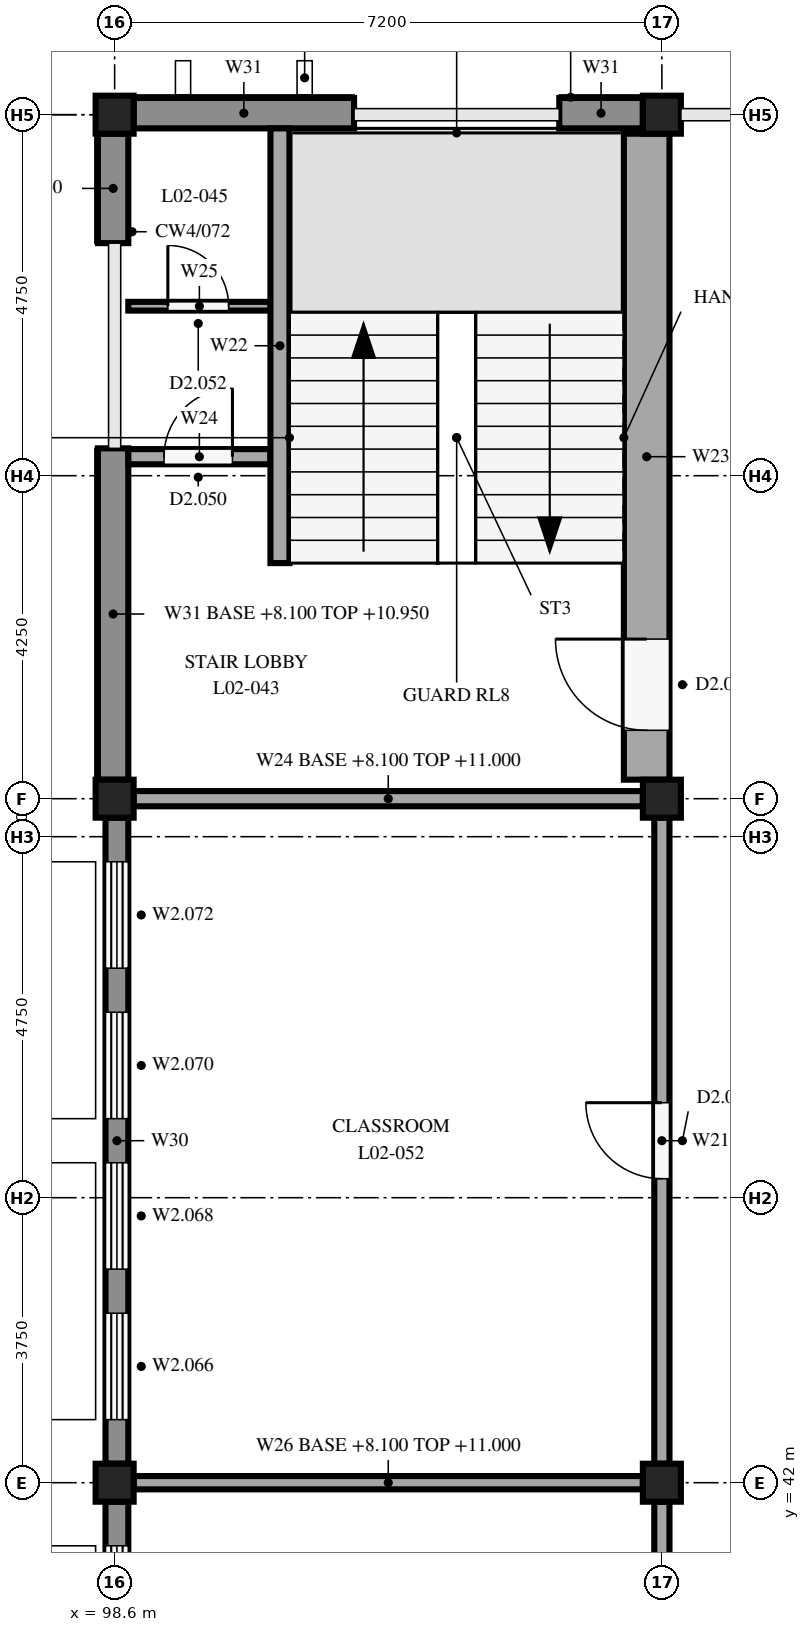
"""IFC4 building model, lengths in metres.
Left out: names, types, materials, properties, quantities, classifications, styles, units other than length and angle.
Written with IfcOpenShell. Run it as: python <this file> out.ifc"""

import sys

from ifc_helpers import new_model, si_unit, direction, frame, frame_2d, origin, origin_2d, place, context, subcontext, project, spatial, rectangle, extrude, element, fill, save


model = new_model("IFC4")
c1 = context("Model", 3, precision=1e-05, world=origin(), true_north=direction((0.0, 1.0)))
c2 = subcontext(c1, "Body", "Model", "MODEL_VIEW")
j1 = project(units=[si_unit("LENGTHUNIT", "METRE"), si_unit("PLANEANGLEUNIT", "RADIAN")], contexts=[c1])
p1 = place(None, origin())
s1 = spatial("IfcSite", under=j1, at=p1, CompositionType="ELEMENT")
p2 = place(p1, origin())
s2 = spatial("IfcBuilding", under=s1, at=p2, CompositionType="ELEMENT")
p3 = place(p2, frame((0.0, 0.0, 8.1)))
s3 = spatial("IfcBuildingStorey", under=s2, at=p3, CompositionType="ELEMENT", Elevation=8.1)
for number, where, z_axis, x_axis in (
    (1, (98.6, 42.0, 0.0), (0.0, 0.0, 1.0), (1.0, 0.0, 0.0)),
    (2, (98.6, 51.0, 0.0), (0.0, 0.0, 1.0), (1.0, 0.0, 0.0)),
    (3, (98.6, 60.0, 0.0), (0.0, 0.0, 1.0), (1.0, 0.0, 0.0)),
    (4, (105.8, 42.0, 0.0), (0.0, 0.0, 1.0), (1.0, 0.0, 0.0)),
    (5, (105.8, 51.0, 0.0), (0.0, 0.0, 1.0), (1.0, 0.0, 0.0)),
    (6, (105.8, 60.0, 0.0), (0.0, 0.0, 1.0), (1.0, 0.0, 0.0)),
):
    element("IfcColumn", number, at=place(p3, frame(where, z_axis=z_axis, x_axis=x_axis)), inside=s3, PredefinedType="COLUMN", context=c2, shape_type="SweptSolid", body=[
        extrude(rectangle(XDim=0.5, YDim=0.5, at=origin_2d()), origin(), (0.0, 0.0, 1.0), 3.35),
    ])
p4 = place(p3, frame((98.63, 33.25, 0.0), z_axis=(0.0, 0.0, 1.0), x_axis=(0.0, 1.0, 0.0)))
e7 = element("IfcWall", 7, at=p4, inside=s3, PredefinedType="STANDARD", context=c2, shape_type="SweptSolid", body=[
    extrude(rectangle(XDim=8.5, YDim=0.3, at=frame_2d((4.25, 0.0))), origin(), (0.0, 0.0, 1.0), 2.85),
])
p5 = place(p4, frame((0.58, 0.0, 0.3)))
e8 = element("IfcOpeningElement", 8, at=p5, cuts=e7, PredefinedType="OPENING", context=c2, shape_type="SweptSolid", body=[
    extrude(rectangle(XDim=1.4, YDim=2.5, at=frame_2d((0.7, 1.25))), frame((0.0, 0.16, 0.0), z_axis=(0.0, -1.0, 0.0), x_axis=(1.0, 0.0, 0.0)), (0.0, 0.0, 1.0), 0.32),
])
p6 = place(p4, frame((2.56, 0.0, 0.3)))
e9 = element("IfcOpeningElement", 9, at=p6, cuts=e7, PredefinedType="OPENING", context=c2, shape_type="SweptSolid", body=[
    extrude(rectangle(XDim=1.4, YDim=2.5, at=frame_2d((0.7, 1.25))), frame((0.0, 0.16, 0.0), z_axis=(0.0, -1.0, 0.0), x_axis=(1.0, 0.0, 0.0)), (0.0, 0.0, 1.0), 0.32),
])
p7 = place(p4, frame((4.54, 0.0, 0.3)))
e10 = element("IfcOpeningElement", 10, at=p7, cuts=e7, PredefinedType="OPENING", context=c2, shape_type="SweptSolid", body=[
    extrude(rectangle(XDim=1.4, YDim=2.5, at=frame_2d((0.7, 1.25))), frame((0.0, 0.16, 0.0), z_axis=(0.0, -1.0, 0.0), x_axis=(1.0, 0.0, 0.0)), (0.0, 0.0, 1.0), 0.32),
])
p8 = place(p4, frame((6.52, 0.0, 0.3)))
e11 = element("IfcOpeningElement", 11, at=p8, cuts=e7, PredefinedType="OPENING", context=c2, shape_type="SweptSolid", body=[
    extrude(rectangle(XDim=1.4, YDim=2.5, at=frame_2d((0.7, 1.25))), frame((0.0, 0.16, 0.0), z_axis=(0.0, -1.0, 0.0), x_axis=(1.0, 0.0, 0.0)), (0.0, 0.0, 1.0), 0.32),
])
p9 = place(p3, frame((98.63, 42.25, 0.0), z_axis=(0.0, 0.0, 1.0), x_axis=(0.0, 1.0, 0.0)))
e12 = element("IfcWall", 12, at=p9, inside=s3, PredefinedType="STANDARD", context=c2, shape_type="SweptSolid", body=[
    extrude(rectangle(XDim=8.5, YDim=0.3, at=frame_2d((4.25, 0.0))), origin(), (0.0, 0.0, 1.0), 2.85),
])
p10 = place(p9, frame((0.58, 0.0, 0.6)))
e13 = element("IfcOpeningElement", 13, at=p10, cuts=e12, PredefinedType="OPENING", context=c2, shape_type="SweptSolid", body=[
    extrude(rectangle(XDim=1.4, YDim=2.2, at=frame_2d((0.7, 1.1))), frame((0.0, 0.16, 0.0), z_axis=(0.0, -1.0, 0.0), x_axis=(1.0, 0.0, 0.0)), (0.0, 0.0, 1.0), 0.32),
])
p11 = place(p9, frame((2.56, 0.0, 0.6)))
e14 = element("IfcOpeningElement", 14, at=p11, cuts=e12, PredefinedType="OPENING", context=c2, shape_type="SweptSolid", body=[
    extrude(rectangle(XDim=1.4, YDim=2.2, at=frame_2d((0.7, 1.1))), frame((0.0, 0.16, 0.0), z_axis=(0.0, -1.0, 0.0), x_axis=(1.0, 0.0, 0.0)), (0.0, 0.0, 1.0), 0.32),
])
p12 = place(p9, frame((4.54, 0.0, 0.6)))
e15 = element("IfcOpeningElement", 15, at=p12, cuts=e12, PredefinedType="OPENING", context=c2, shape_type="SweptSolid", body=[
    extrude(rectangle(XDim=1.4, YDim=2.2, at=frame_2d((0.7, 1.1))), frame((0.0, 0.16, 0.0), z_axis=(0.0, -1.0, 0.0), x_axis=(1.0, 0.0, 0.0)), (0.0, 0.0, 1.0), 0.32),
])
p13 = place(p9, frame((6.52, 0.0, 0.6)))
e16 = element("IfcOpeningElement", 16, at=p13, cuts=e12, PredefinedType="OPENING", context=c2, shape_type="SweptSolid", body=[
    extrude(rectangle(XDim=1.4, YDim=2.2, at=frame_2d((0.7, 1.1))), frame((0.0, 0.16, 0.0), z_axis=(0.0, -1.0, 0.0), x_axis=(1.0, 0.0, 0.0)), (0.0, 0.0, 1.0), 0.32),
])
p14 = place(p3, frame((98.58, 51.25, 0.0), z_axis=(0.0, 0.0, 1.0), x_axis=(0.0, 1.0, 0.0)))
e17 = element("IfcWall", 17, at=p14, inside=s3, PredefinedType="STANDARD", context=c2, shape_type="SweptSolid", body=[
    extrude(rectangle(XDim=4.36, YDim=0.4, at=frame_2d((2.18, 0.0))), origin(), (0.0, 0.0, 1.0), 2.85),
])
p15 = place(p3, frame((98.58, 58.31, 0.0), z_axis=(0.0, 0.0, 1.0), x_axis=(0.0, 1.0, 0.0)))
e18 = element("IfcWall", 18, at=p15, inside=s3, PredefinedType="STANDARD", context=c2, shape_type="SweptSolid", body=[
    extrude(rectangle(XDim=1.44, YDim=0.4, at=frame_2d((0.72, 0.0))), origin(), (0.0, 0.0, 1.0), 2.85),
])
p16 = place(p3, frame((98.85, 60.02, 0.0), z_axis=(0.0, 0.0, 1.0), x_axis=(1.0, 0.0, 0.0)))
e19 = element("IfcWall", 19, at=p16, inside=s3, PredefinedType="STANDARD", context=c2, shape_type="SweptSolid", body=[
    extrude(rectangle(XDim=2.9, YDim=0.4, at=frame_2d((1.45, 0.0))), origin(), (0.0, 0.0, 1.0), 2.9),
])
p17 = place(p3, frame((104.45, 60.02, 0.0), z_axis=(0.0, 0.0, 1.0), x_axis=(1.0, 0.0, 0.0)))
e20 = element("IfcWall", 20, at=p17, inside=s3, PredefinedType="STANDARD", context=c2, shape_type="SweptSolid", body=[
    extrude(rectangle(XDim=1.1, YDim=0.4, at=frame_2d((0.55, 0.0))), origin(), (0.0, 0.0, 1.0), 2.9),
])
p18 = place(p3, frame((100.775, 54.1, 0.0), z_axis=(0.0, 0.0, 1.0), x_axis=(0.0, 1.0, 0.0)))
e21 = element("IfcWall", 21, at=p18, inside=s3, PredefinedType="SOLIDWALL", context=c2, shape_type="SweptSolid", body=[
    extrude(rectangle(XDim=5.72, YDim=0.25, at=frame_2d((2.86, 0.0))), origin(), (0.0, 0.0, 1.0), 3.35),
])
p19 = place(p3, frame((105.6, 51.25, 0.0), z_axis=(0.0, 0.0, 1.0), x_axis=(0.0, 1.0, 0.0)))
e22 = element("IfcWall", 22, at=p19, inside=s3, PredefinedType="SOLIDWALL", context=c2, shape_type="SweptSolid", body=[
    extrude(rectangle(XDim=8.5, YDim=0.6, at=frame_2d((4.25, 0.0))), origin(), (0.0, 0.0, 1.0), 3.35),
])
p20 = place(p19, frame((0.65, 0.0, 0.0)))
e23 = element("IfcOpeningElement", 23, at=p20, cuts=e22, PredefinedType="OPENING", context=c2, shape_type="SweptSolid", body=[
    extrude(rectangle(XDim=1.2, YDim=2.1, at=frame_2d((0.6, 1.05))), frame((0.0, 0.31, 0.0), z_axis=(0.0, -1.0, 0.0), x_axis=(1.0, 0.0, 0.0)), (0.0, 0.0, 1.0), 0.62),
])
p21 = place(p3, frame((98.78, 55.5, 0.0), z_axis=(0.0, 0.0, 1.0), x_axis=(1.0, 0.0, 0.0)))
e24 = element("IfcWall", 24, at=p21, inside=s3, PredefinedType="SOLIDWALL", context=c2, shape_type="SweptSolid", body=[
    extrude(rectangle(XDim=1.87, YDim=0.2, at=frame_2d((0.935, 0.0))), origin(), (0.0, 0.0, 1.0), 3.35),
])
p22 = place(p21, frame((0.47, 0.0, 0.0)))
e25 = element("IfcOpeningElement", 25, at=p22, cuts=e24, PredefinedType="OPENING", context=c2, shape_type="SweptSolid", body=[
    extrude(rectangle(XDim=0.9, YDim=2.1, at=frame_2d((0.45, 1.05))), frame((0.0, 0.11, 0.0), z_axis=(0.0, -1.0, 0.0), x_axis=(1.0, 0.0, 0.0)), (0.0, 0.0, 1.0), 0.22),
])
p23 = place(p3, frame((98.78, 57.48, 0.0), z_axis=(0.0, 0.0, 1.0), x_axis=(1.0, 0.0, 0.0)))
e26 = element("IfcWall", 26, at=p23, inside=s3, PredefinedType="PARTITIONING", context=c2, shape_type="SweptSolid", body=[
    extrude(rectangle(XDim=1.87, YDim=0.115, at=frame_2d((0.935, 0.0))), origin(), (0.0, 0.0, 1.0), 3.35),
])
p24 = place(p23, frame((0.52, 0.0, 0.0)))
e27 = element("IfcOpeningElement", 27, at=p24, cuts=e26, PredefinedType="OPENING", context=c2, shape_type="SweptSolid", body=[
    extrude(rectangle(XDim=0.8, YDim=2.1, at=frame_2d((0.4, 1.05))), frame((0.0, 0.067, 0.0), z_axis=(0.0, -1.0, 0.0), x_axis=(1.0, 0.0, 0.0)), (0.0, 0.0, 1.0), 0.135),
])
p25 = place(p3, frame((98.85, 51.0, 0.0), z_axis=(0.0, 0.0, 1.0), x_axis=(1.0, 0.0, 0.0)))
e28 = element("IfcWall", 28, at=p25, inside=s3, PredefinedType="SOLIDWALL", context=c2, shape_type="SweptSolid", body=[
    extrude(rectangle(XDim=6.7, YDim=0.2, at=frame_2d((3.35, 0.0))), origin(), (0.0, 0.0, 1.0), 2.9),
])
p26 = place(p3, frame((105.8, 33.25, 0.0), z_axis=(0.0, 0.0, 1.0), x_axis=(0.0, 1.0, 0.0)))
e29 = element("IfcWall", 29, at=p26, inside=s3, PredefinedType="PARTITIONING", context=c2, shape_type="SweptSolid", body=[
    extrude(rectangle(XDim=8.5, YDim=0.2, at=frame_2d((4.25, 0.0))), origin(), (0.0, 0.0, 1.0), 2.9),
])
p27 = place(p26, frame((3.5, 0.0, 0.0)))
e30 = element("IfcOpeningElement", 30, at=p27, cuts=e29, PredefinedType="OPENING", context=c2, shape_type="SweptSolid", body=[
    extrude(rectangle(XDim=1.5, YDim=2.1, at=frame_2d((0.75, 1.05))), frame((0.0, 0.11, 0.0), z_axis=(0.0, -1.0, 0.0), x_axis=(1.0, 0.0, 0.0)), (0.0, 0.0, 1.0), 0.22),
])
p28 = place(p3, frame((105.8, 42.25, 0.0), z_axis=(0.0, 0.0, 1.0), x_axis=(0.0, 1.0, 0.0)))
e31 = element("IfcWall", 31, at=p28, inside=s3, PredefinedType="PARTITIONING", context=c2, shape_type="SweptSolid", body=[
    extrude(rectangle(XDim=8.5, YDim=0.2, at=frame_2d((4.25, 0.0))), origin(), (0.0, 0.0, 1.0), 2.9),
])
p29 = place(p28, frame((3.75, 0.0, 0.0)))
e32 = element("IfcOpeningElement", 32, at=p29, cuts=e31, PredefinedType="OPENING", context=c2, shape_type="SweptSolid", body=[
    extrude(rectangle(XDim=1.0, YDim=2.1, at=frame_2d((0.5, 1.05))), frame((0.0, 0.11, 0.0), z_axis=(0.0, -1.0, 0.0), x_axis=(1.0, 0.0, 0.0)), (0.0, 0.0, 1.0), 0.22),
])
p30 = place(p3, frame((98.85, 42.0, 0.0), z_axis=(0.0, 0.0, 1.0), x_axis=(1.0, 0.0, 0.0)))
e33 = element("IfcWall", 33, at=p30, inside=s3, PredefinedType="PARTITIONING", context=c2, shape_type="SweptSolid", body=[
    extrude(rectangle(XDim=6.7, YDim=0.175, at=frame_2d((3.35, 0.0))), origin(), (0.0, 0.0, 1.0), 2.9),
])
p31 = place(p8, origin())
e34 = element("IfcWindow", 34, at=p31, inside=s3, PartitioningType="DOUBLE_PANEL_VERTICAL", PredefinedType="WINDOW", context=c2, shape_type="SweptSolid", body=[
    extrude(rectangle(XDim=1.4, YDim=2.5, at=frame_2d((0.7, 1.25))), frame((0.0, 0.03, 0.0), z_axis=(0.0, -1.0, 0.0), x_axis=(1.0, 0.0, 0.0)), (0.0, 0.0, 1.0), 0.06),
])
fill(e11, e34)
p32 = place(p10, origin())
e35 = element("IfcWindow", 35, at=p32, inside=s3, PartitioningType="DOUBLE_PANEL_VERTICAL", PredefinedType="WINDOW", context=c2, shape_type="SweptSolid", body=[
    extrude(rectangle(XDim=1.4, YDim=2.2, at=frame_2d((0.7, 1.1))), frame((0.0, 0.03, 0.0), z_axis=(0.0, -1.0, 0.0), x_axis=(1.0, 0.0, 0.0)), (0.0, 0.0, 1.0), 0.06),
])
fill(e13, e35)
p33 = place(p11, origin())
e36 = element("IfcWindow", 36, at=p33, inside=s3, PartitioningType="DOUBLE_PANEL_VERTICAL", PredefinedType="WINDOW", context=c2, shape_type="SweptSolid", body=[
    extrude(rectangle(XDim=1.4, YDim=2.2, at=frame_2d((0.7, 1.1))), frame((0.0, 0.03, 0.0), z_axis=(0.0, -1.0, 0.0), x_axis=(1.0, 0.0, 0.0)), (0.0, 0.0, 1.0), 0.06),
])
fill(e14, e36)
p34 = place(p12, origin())
e37 = element("IfcWindow", 37, at=p34, inside=s3, PartitioningType="DOUBLE_PANEL_VERTICAL", PredefinedType="WINDOW", context=c2, shape_type="SweptSolid", body=[
    extrude(rectangle(XDim=1.4, YDim=2.2, at=frame_2d((0.7, 1.1))), frame((0.0, 0.03, 0.0), z_axis=(0.0, -1.0, 0.0), x_axis=(1.0, 0.0, 0.0)), (0.0, 0.0, 1.0), 0.06),
])
fill(e15, e37)
p35 = place(p13, origin())
e38 = element("IfcWindow", 38, at=p35, inside=s3, PartitioningType="DOUBLE_PANEL_VERTICAL", PredefinedType="WINDOW", context=c2, shape_type="SweptSolid", body=[
    extrude(rectangle(XDim=1.4, YDim=2.2, at=frame_2d((0.7, 1.1))), frame((0.0, 0.03, 0.0), z_axis=(0.0, -1.0, 0.0), x_axis=(1.0, 0.0, 0.0)), (0.0, 0.0, 1.0), 0.06),
])
fill(e16, e38)
p36 = place(p20, origin())
e39 = element("IfcDoor", 39, at=p36, inside=s3, OperationType="SINGLE_SWING_RIGHT", PredefinedType="DOOR", context=c2, shape_type="SweptSolid", body=[
    extrude(rectangle(XDim=1.2, YDim=2.1, at=frame_2d((0.6, 1.05))), frame((0.0, 0.025, 0.0), z_axis=(0.0, -1.0, 0.0), x_axis=(1.0, 0.0, 0.0)), (0.0, 0.0, 1.0), 0.05),
])
fill(e23, e39)
p37 = place(p22, origin())
e40 = element("IfcDoor", 40, at=p37, inside=s3, OperationType="SINGLE_SWING_RIGHT", PredefinedType="DOOR", context=c2, shape_type="SweptSolid", body=[
    extrude(rectangle(XDim=0.9, YDim=2.1, at=frame_2d((0.45, 1.05))), frame((0.0, 0.025, 0.0), z_axis=(0.0, -1.0, 0.0), x_axis=(1.0, 0.0, 0.0)), (0.0, 0.0, 1.0), 0.05),
])
fill(e25, e40)
p38 = place(p24, origin())
e41 = element("IfcDoor", 41, at=p38, inside=s3, OperationType="SINGLE_SWING_LEFT", PredefinedType="DOOR", context=c2, shape_type="SweptSolid", body=[
    extrude(rectangle(XDim=0.8, YDim=2.1, at=frame_2d((0.4, 1.05))), frame((0.0, 0.025, 0.0), z_axis=(0.0, -1.0, 0.0), x_axis=(1.0, 0.0, 0.0)), (0.0, 0.0, 1.0), 0.05),
])
fill(e27, e41)
p39 = place(p29, origin())
e42 = element("IfcDoor", 42, at=p39, inside=s3, OperationType="SINGLE_SWING_RIGHT", PredefinedType="DOOR", context=c2, shape_type="SweptSolid", body=[
    extrude(rectangle(XDim=1.0, YDim=2.1, at=frame_2d((0.5, 1.05))), frame((0.0, 0.025, 0.0), z_axis=(0.0, -1.0, 0.0), x_axis=(1.0, 0.0, 0.0)), (0.0, 0.0, 1.0), 0.05),
])
fill(e32, e42)
save(model, sys.argv[1])
